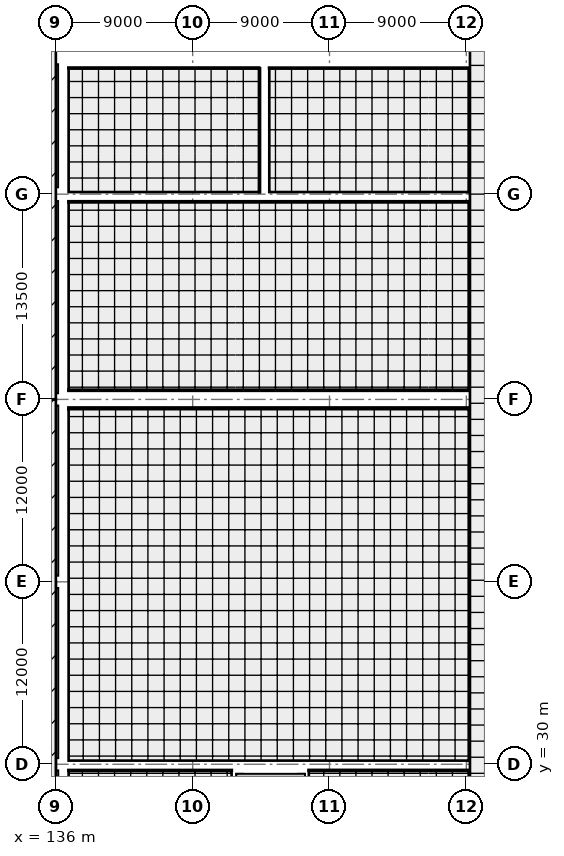
"""IFC4 building model, lengths in metres.
Left out: names, types, materials, properties, quantities, classifications, styles, units other than length and angle.
Written with IfcOpenShell. Run it as: python <this file> out.ifc"""

import sys

from ifc_helpers import new_model, si_unit, direction, frame, frame_2d, origin, origin_2d, place, context, subcontext, project, spatial, rectangle, extrude, element, fill, save


model = new_model("IFC4")
c1 = context("Model", 3, precision=1e-05, world=origin(), true_north=direction((0.0, 1.0)))
c2 = subcontext(c1, "Body", "Model", "MODEL_VIEW")
j1 = project(units=[si_unit("LENGTHUNIT", "METRE"), si_unit("PLANEANGLEUNIT", "RADIAN")], contexts=[c1])
p1 = place(None, origin())
s1 = spatial("IfcSite", under=j1, at=p1, CompositionType="ELEMENT")
p2 = place(p1, origin())
s2 = spatial("IfcBuilding", under=s1, at=p2, CompositionType="ELEMENT")
p3 = place(p2, origin())
s3 = spatial("IfcBuildingStorey", under=s2, at=p3, CompositionType="ELEMENT", Elevation=0.0)
for number, where, z_axis, x_axis in (
    (1, (136.0, 30.0, 0.0), (0.0, 0.0, 1.0), (1.0, 0.0, 0.0)),
    (2, (136.0, 42.0, 0.0), (0.0, 0.0, 1.0), (1.0, 0.0, 0.0)),
    (3, (136.0, 54.0, 0.0), (0.0, 0.0, 1.0), (1.0, 0.0, 0.0)),
):
    element("IfcColumn", number, at=place(p3, frame(where, z_axis=z_axis, x_axis=x_axis)), inside=s3, PredefinedType="COLUMN", context=c2, shape_type="SweptSolid", body=[
        extrude(rectangle(XDim=0.8, YDim=0.8, at=origin_2d()), origin(), (0.0, 0.0, 1.0), 6.6),
    ])
for number, where, z_axis, x_axis in (
    (4, (136.0, 67.5, 0.0), (0.0, 0.0, 1.0), (1.0, 0.0, 0.0)),
    (5, (136.0, 76.5, 0.0), (0.0, 0.0, 1.0), (1.0, 0.0, 0.0)),
):
    element("IfcColumn", number, at=place(p3, frame(where, z_axis=z_axis, x_axis=x_axis)), inside=s3, PredefinedType="COLUMN", context=c2, shape_type="SweptSolid", body=[
        extrude(rectangle(XDim=0.9, YDim=0.9, at=origin_2d()), origin(), (0.0, 0.0, 1.0), 6.6),
    ])
for number, where, z_axis, x_axis in (
    (6, (145.0, 30.0, 0.0), (0.0, 0.0, 1.0), (1.0, 0.0, 0.0)),
    (7, (145.0, 42.0, 0.0), (0.0, 0.0, 1.0), (1.0, 0.0, 0.0)),
    (8, (145.0, 54.0, 0.0), (0.0, 0.0, 1.0), (1.0, 0.0, 0.0)),
):
    element("IfcColumn", number, at=place(p3, frame(where, z_axis=z_axis, x_axis=x_axis)), inside=s3, PredefinedType="COLUMN", context=c2, shape_type="SweptSolid", body=[
        extrude(rectangle(XDim=0.8, YDim=0.8, at=origin_2d()), origin(), (0.0, 0.0, 1.0), 6.6),
    ])
for number, where, z_axis, x_axis in (
    (9, (145.0, 67.5, 0.0), (0.0, 0.0, 1.0), (1.0, 0.0, 0.0)),
    (10, (145.0, 76.5, 0.0), (0.0, 0.0, 1.0), (1.0, 0.0, 0.0)),
):
    element("IfcColumn", number, at=place(p3, frame(where, z_axis=z_axis, x_axis=x_axis)), inside=s3, PredefinedType="COLUMN", context=c2, shape_type="SweptSolid", body=[
        extrude(rectangle(XDim=0.9, YDim=0.9, at=origin_2d()), origin(), (0.0, 0.0, 1.0), 6.6),
    ])
for number, where, z_axis, x_axis in (
    (11, (154.0, 30.0, 0.0), (0.0, 0.0, 1.0), (1.0, 0.0, 0.0)),
    (12, (154.0, 42.0, 0.0), (0.0, 0.0, 1.0), (1.0, 0.0, 0.0)),
    (13, (154.0, 54.0, 0.0), (0.0, 0.0, 1.0), (1.0, 0.0, 0.0)),
):
    element("IfcColumn", number, at=place(p3, frame(where, z_axis=z_axis, x_axis=x_axis)), inside=s3, PredefinedType="COLUMN", context=c2, shape_type="SweptSolid", body=[
        extrude(rectangle(XDim=0.8, YDim=0.8, at=origin_2d()), origin(), (0.0, 0.0, 1.0), 6.6),
    ])
for number, where, z_axis, x_axis in (
    (14, (154.0, 67.5, 0.0), (0.0, 0.0, 1.0), (1.0, 0.0, 0.0)),
    (15, (154.0, 76.5, 0.0), (0.0, 0.0, 1.0), (1.0, 0.0, 0.0)),
):
    element("IfcColumn", number, at=place(p3, frame(where, z_axis=z_axis, x_axis=x_axis)), inside=s3, PredefinedType="COLUMN", context=c2, shape_type="SweptSolid", body=[
        extrude(rectangle(XDim=0.9, YDim=0.9, at=origin_2d()), origin(), (0.0, 0.0, 1.0), 6.6),
    ])
for number, where, z_axis, x_axis in (
    (16, (163.0, 30.0, 0.0), (0.0, 0.0, 1.0), (1.0, 0.0, 0.0)),
    (17, (163.0, 42.0, 0.0), (0.0, 0.0, 1.0), (1.0, 0.0, 0.0)),
    (18, (163.0, 54.0, 0.0), (0.0, 0.0, 1.0), (1.0, 0.0, 0.0)),
):
    element("IfcColumn", number, at=place(p3, frame(where, z_axis=z_axis, x_axis=x_axis)), inside=s3, PredefinedType="COLUMN", context=c2, shape_type="SweptSolid", body=[
        extrude(rectangle(XDim=0.8, YDim=0.8, at=origin_2d()), origin(), (0.0, 0.0, 1.0), 6.6),
    ])
for number, where, z_axis, x_axis in (
    (19, (163.0, 67.5, 0.0), (0.0, 0.0, 1.0), (1.0, 0.0, 0.0)),
    (20, (163.0, 76.5, 0.0), (0.0, 0.0, 1.0), (1.0, 0.0, 0.0)),
):
    element("IfcColumn", number, at=place(p3, frame(where, z_axis=z_axis, x_axis=x_axis)), inside=s3, PredefinedType="COLUMN", context=c2, shape_type="SweptSolid", body=[
        extrude(rectangle(XDim=0.9, YDim=0.9, at=origin_2d()), origin(), (0.0, 0.0, 1.0), 6.6),
    ])
p4 = place(p3, frame((136.0, 18.4, 0.0), z_axis=(0.0, 0.0, 1.0), x_axis=(0.0, 1.0, 0.0)))
e21 = element("IfcWall", 21, at=p4, inside=s3, PredefinedType="SOLIDWALL", context=c2, shape_type="SweptSolid", body=[
    extrude(rectangle(XDim=11.2, YDim=0.32, at=frame_2d((5.6, 0.0))), origin(), (0.0, 0.0, 1.0), 5.785),
])
p5 = place(p3, frame((136.0, 30.4, 0.0), z_axis=(0.0, 0.0, 1.0), x_axis=(0.0, 1.0, 0.0)))
e22 = element("IfcWall", 22, at=p5, inside=s3, PredefinedType="SOLIDWALL", context=c2, shape_type="SweptSolid", body=[
    extrude(rectangle(XDim=11.2, YDim=0.32, at=frame_2d((5.6, 0.0))), origin(), (0.0, 0.0, 1.0), 5.785),
])
p6 = place(p5, frame((2.767, 0.0, 0.0)))
e23 = element("IfcOpeningElement", 23, at=p6, cuts=e22, PredefinedType="OPENING", context=c2, shape_type="SweptSolid", body=[
    extrude(rectangle(XDim=2.2, YDim=2.45, at=frame_2d((1.1, 1.225))), frame((0.0, 0.17, 0.0), z_axis=(0.0, -1.0, 0.0), x_axis=(1.0, 0.0, 0.0)), (0.0, 0.0, 1.0), 0.34),
])
p7 = place(p5, frame((6.283, 0.0, 0.95)))
e24 = element("IfcOpeningElement", 24, at=p7, cuts=e22, PredefinedType="OPENING", context=c2, shape_type="SweptSolid", body=[
    extrude(rectangle(XDim=2.1, YDim=2.0, at=frame_2d((1.05, 1.0))), frame((0.0, 0.17, 0.0), z_axis=(0.0, -1.0, 0.0), x_axis=(1.0, 0.0, 0.0)), (0.0, 0.0, 1.0), 0.34),
])
p8 = place(p3, frame((136.0, 42.4, 0.0), z_axis=(0.0, 0.0, 1.0), x_axis=(0.0, 1.0, 0.0)))
e25 = element("IfcWall", 25, at=p8, inside=s3, PredefinedType="SOLIDWALL", context=c2, shape_type="SweptSolid", body=[
    extrude(rectangle(XDim=11.2, YDim=0.32, at=frame_2d((5.6, 0.0))), origin(), (0.0, 0.0, 1.0), 5.77),
])
p9 = place(p8, frame((2.867, 0.0, 0.0)))
e26 = element("IfcOpeningElement", 26, at=p9, cuts=e25, PredefinedType="OPENING", context=c2, shape_type="SweptSolid", body=[
    extrude(rectangle(XDim=2.0, YDim=2.4, at=frame_2d((1.0, 1.2))), frame((0.0, 0.17, 0.0), z_axis=(0.0, -1.0, 0.0), x_axis=(1.0, 0.0, 0.0)), (0.0, 0.0, 1.0), 0.34),
])
p10 = place(p8, frame((6.433, 0.0, 0.95)))
e27 = element("IfcOpeningElement", 27, at=p10, cuts=e25, PredefinedType="OPENING", context=c2, shape_type="SweptSolid", body=[
    extrude(rectangle(XDim=1.8, YDim=2.0, at=frame_2d((0.9, 1.0))), frame((0.0, 0.17, 0.0), z_axis=(0.0, -1.0, 0.0), x_axis=(1.0, 0.0, 0.0)), (0.0, 0.0, 1.0), 0.34),
])
p11 = place(p3, frame((136.0, 54.4, 0.0), z_axis=(0.0, 0.0, 1.0), x_axis=(0.0, 1.0, 0.0)))
e28 = element("IfcWall", 28, at=p11, inside=s3, PredefinedType="SOLIDWALL", context=c2, shape_type="SweptSolid", body=[
    extrude(rectangle(XDim=12.65, YDim=0.3, at=frame_2d((6.325, 0.0))), origin(), (0.0, 0.0, 1.0), 5.77),
])
p12 = place(p11, frame((3.567, 0.0, 0.95)))
e29 = element("IfcOpeningElement", 29, at=p12, cuts=e28, PredefinedType="OPENING", context=c2, shape_type="SweptSolid", body=[
    extrude(rectangle(XDim=1.6, YDim=1.9, at=frame_2d((0.8, 0.95))), frame((0.0, 0.16, 0.0), z_axis=(0.0, -1.0, 0.0), x_axis=(1.0, 0.0, 0.0)), (0.0, 0.0, 1.0), 0.32),
])
p13 = place(p11, frame((6.833, 0.0, 0.95)))
e30 = element("IfcOpeningElement", 30, at=p13, cuts=e28, PredefinedType="OPENING", context=c2, shape_type="SweptSolid", body=[
    extrude(rectangle(XDim=3.0, YDim=2.1, at=frame_2d((1.5, 1.05))), frame((0.0, 0.16, 0.0), z_axis=(0.0, -1.0, 0.0), x_axis=(1.0, 0.0, 0.0)), (0.0, 0.0, 1.0), 0.32),
])
p14 = place(p3, frame((136.0, 67.95, 0.0), z_axis=(0.0, 0.0, 1.0), x_axis=(0.0, 1.0, 0.0)))
e31 = element("IfcWall", 31, at=p14, inside=s3, PredefinedType="SOLIDWALL", context=c2, shape_type="SweptSolid", body=[
    extrude(rectangle(XDim=8.1, YDim=0.3, at=frame_2d((4.05, 0.0))), origin(), (0.0, 0.0, 1.0), 5.77),
])
p15 = place(p14, frame((2.7, 0.0, 0.95)))
e32 = element("IfcOpeningElement", 32, at=p15, cuts=e31, PredefinedType="OPENING", context=c2, shape_type="SweptSolid", body=[
    extrude(rectangle(XDim=2.7, YDim=2.1, at=frame_2d((1.35, 1.05))), frame((0.0, 0.16, 0.0), z_axis=(0.0, -1.0, 0.0), x_axis=(1.0, 0.0, 0.0)), (0.0, 0.0, 1.0), 0.32),
])
for number, where, z_axis, x_axis in (
    (33, (152.163, 18.675, 0.0), (0.0, 0.0, 1.0), (0.0, 1.0, 0.0)),
    (34, (148.093, 29.373, 0.0), (0.0, 0.0, 1.0), (0.0, -1.0, 0.0)),
):
    element("IfcWall", number, at=place(p3, frame(where, z_axis=z_axis, x_axis=x_axis)), inside=s3, PredefinedType="SHEAR", context=c2, shape_type="SweptSolid", body=[
        extrude(rectangle(XDim=10.698, YDim=0.45, at=frame_2d((5.349, 0.0))), origin(), (0.0, 0.0, 1.0), 6.36),
    ])
p16 = place(p3, frame((152.387, 29.147, 0.0), z_axis=(0.0, 0.0, 1.0), x_axis=(-1.0, 0.0, 0.0)))
e35 = element("IfcWall", 35, at=p16, inside=s3, PredefinedType="SHEAR", context=c2, shape_type="SweptSolid", body=[
    extrude(rectangle(XDim=4.52, YDim=0.45, at=frame_2d((2.26, 0.0))), origin(), (0.0, 0.0, 1.0), 6.36),
])
p17 = place(p3, frame((152.6, 29.6, 0.0), z_axis=(0.0, 0.0, 1.0), x_axis=(1.0, 0.0, 0.0)))
e36 = element("IfcWall", 36, at=p17, inside=s3, PredefinedType="PARTITIONING", context=c2, shape_type="SweptSolid", body=[
    extrude(rectangle(XDim=10.6, YDim=0.11, at=frame_2d((5.3, 0.0))), origin(), (0.0, 0.0, 1.0), 4.4),
])
p18 = place(p3, frame((163.2, 29.6, 0.0), z_axis=(0.0, 0.0, 1.0), x_axis=(0.0, -1.0, 0.0)))
e37 = element("IfcWall", 37, at=p18, inside=s3, PredefinedType="PARTITIONING", context=c2, shape_type="SweptSolid", body=[
    extrude(rectangle(XDim=12.8, YDim=0.11, at=frame_2d((6.4, 0.0))), origin(), (0.0, 0.0, 1.0), 4.4),
])
p19 = place(p18, frame((5.625, 0.0, 0.0)))
e38 = element("IfcOpeningElement", 38, at=p19, cuts=e37, PredefinedType="OPENING", context=c2, shape_type="SweptSolid", body=[
    extrude(rectangle(XDim=1.55, YDim=2.1, at=frame_2d((0.775, 1.05))), frame((0.0, 0.065, 0.0), z_axis=(0.0, -1.0, 0.0), x_axis=(1.0, 0.0, 0.0)), (0.0, 0.0, 1.0), 0.13),
])
p20 = place(p3, frame((136.8, 29.6, 0.0), z_axis=(0.0, 0.0, 1.0), x_axis=(1.0, 0.0, 0.0)))
e39 = element("IfcWall", 39, at=p20, inside=s3, PredefinedType="PARTITIONING", context=c2, shape_type="SweptSolid", body=[
    extrude(rectangle(XDim=10.8, YDim=0.1, at=frame_2d((5.4, 0.0))), origin(), (0.0, 0.0, 1.0), 4.4),
])
p21 = place(p3, frame((136.8, 53.4, 0.0), z_axis=(0.0, 0.0, 1.0), x_axis=(1.0, 0.0, 0.0)))
e40 = element("IfcWall", 40, at=p21, inside=s3, PredefinedType="PARTITIONING", context=c2, shape_type="SweptSolid", body=[
    extrude(rectangle(XDim=26.4, YDim=0.19, at=frame_2d((13.2, 0.0))), origin(), (0.0, 0.0, 1.0), 4.4),
])
p22 = place(p3, frame((163.2, 53.4, 0.0), z_axis=(0.0, 0.0, 1.0), x_axis=(0.0, -1.0, 0.0)))
e41 = element("IfcWall", 41, at=p22, inside=s3, PredefinedType="PARTITIONING", context=c2, shape_type="SweptSolid", body=[
    extrude(rectangle(XDim=23.2, YDim=0.19, at=frame_2d((11.6, 0.0))), origin(), (0.0, 0.0, 1.0), 4.4),
])
p23 = place(p22, frame((12.425, 0.0, 0.0)))
e42 = element("IfcOpeningElement", 42, at=p23, cuts=e41, PredefinedType="OPENING", context=c2, shape_type="SweptSolid", body=[
    extrude(rectangle(XDim=1.55, YDim=2.1, at=frame_2d((0.775, 1.05))), frame((0.0, 0.105, 0.0), z_axis=(0.0, -1.0, 0.0), x_axis=(1.0, 0.0, 0.0)), (0.0, 0.0, 1.0), 0.21),
])
for number, where, z_axis, x_axis in (
    (43, (163.2, 54.6, 0.0), (0.0, 0.0, 1.0), (-1.0, 0.0, 0.0)),
    (44, (136.8, 67.0, 0.0), (0.0, 0.0, 1.0), (1.0, 0.0, 0.0)),
):
    element("IfcWall", number, at=place(p3, frame(where, z_axis=z_axis, x_axis=x_axis)), inside=s3, PredefinedType="PARTITIONING", context=c2, shape_type="SweptSolid", body=[
        extrude(rectangle(XDim=26.4, YDim=0.12, at=frame_2d((13.2, 0.0))), origin(), (0.0, 0.0, 1.0), 4.4),
    ])
p24 = place(p3, frame((163.2, 67.0, 0.0), z_axis=(0.0, 0.0, 1.0), x_axis=(0.0, -1.0, 0.0)))
e45 = element("IfcWall", 45, at=p24, inside=s3, PredefinedType="PARTITIONING", context=c2, shape_type="SweptSolid", body=[
    extrude(rectangle(XDim=12.4, YDim=0.12, at=frame_2d((6.2, 0.0))), origin(), (0.0, 0.0, 1.0), 4.4),
])
p25 = place(p24, frame((5.525, 0.0, 0.0)))
e46 = element("IfcOpeningElement", 46, at=p25, cuts=e45, PredefinedType="OPENING", context=c2, shape_type="SweptSolid", body=[
    extrude(rectangle(XDim=1.35, YDim=2.1, at=frame_2d((0.675, 1.05))), frame((0.0, 0.07, 0.0), z_axis=(0.0, -1.0, 0.0), x_axis=(1.0, 0.0, 0.0)), (0.0, 0.0, 1.0), 0.14),
])
p26 = place(p3, frame((136.8, 75.8, 0.0), z_axis=(0.0, 0.0, 1.0), x_axis=(1.0, 0.0, 0.0)))
e47 = element("IfcWall", 47, at=p26, inside=s3, PredefinedType="PARTITIONING", context=c2, shape_type="SweptSolid", body=[
    extrude(rectangle(XDim=12.6, YDim=0.11, at=frame_2d((6.3, 0.0))), origin(), (0.0, 0.0, 1.0), 4.4),
])
p27 = place(p26, frame((5.85, 0.0, 0.0)))
e48 = element("IfcOpeningElement", 48, at=p27, cuts=e47, PredefinedType="OPENING", context=c2, shape_type="SweptSolid", body=[
    extrude(rectangle(XDim=0.9, YDim=2.1, at=frame_2d((0.45, 1.05))), frame((0.0, 0.065, 0.0), z_axis=(0.0, -1.0, 0.0), x_axis=(1.0, 0.0, 0.0)), (0.0, 0.0, 1.0), 0.13),
])
p28 = place(p3, frame((149.4, 75.8, 0.0), z_axis=(0.0, 0.0, 1.0), x_axis=(0.0, -1.0, 0.0)))
e49 = element("IfcWall", 49, at=p28, inside=s3, PredefinedType="PARTITIONING", context=c2, shape_type="SweptSolid", body=[
    extrude(rectangle(XDim=8.2, YDim=0.11, at=frame_2d((4.1, 0.0))), origin(), (0.0, 0.0, 1.0), 4.4),
])
p29 = place(p3, frame((150.0, 75.8, 0.0), z_axis=(0.0, 0.0, 1.0), x_axis=(1.0, 0.0, 0.0)))
e50 = element("IfcWall", 50, at=p29, inside=s3, PredefinedType="PARTITIONING", context=c2, shape_type="SweptSolid", body=[
    extrude(rectangle(XDim=13.2, YDim=0.1, at=frame_2d((6.6, 0.0))), origin(), (0.0, 0.0, 1.0), 4.4),
])
p30 = place(p29, frame((6.15, 0.0, 0.0)))
e51 = element("IfcOpeningElement", 51, at=p30, cuts=e50, PredefinedType="OPENING", context=c2, shape_type="SweptSolid", body=[
    extrude(rectangle(XDim=0.9, YDim=2.1, at=frame_2d((0.45, 1.05))), frame((0.0, 0.06, 0.0), z_axis=(0.0, -1.0, 0.0), x_axis=(1.0, 0.0, 0.0)), (0.0, 0.0, 1.0), 0.12),
])
p31 = place(p3, frame((163.2, 75.8, 0.0), z_axis=(0.0, 0.0, 1.0), x_axis=(0.0, -1.0, 0.0)))
e52 = element("IfcWall", 52, at=p31, inside=s3, PredefinedType="PARTITIONING", context=c2, shape_type="SweptSolid", body=[
    extrude(rectangle(XDim=8.2, YDim=0.1, at=frame_2d((4.1, 0.0))), origin(), (0.0, 0.0, 1.0), 4.4),
])
p32 = place(p6, origin())
e53 = element("IfcDoor", 53, at=p32, inside=s3, OperationType="SINGLE_SWING_LEFT", PredefinedType="DOOR", context=c2, shape_type="SweptSolid", body=[
    extrude(rectangle(XDim=2.2, YDim=2.45, at=frame_2d((1.1, 1.225))), frame((0.0, 0.025, 0.0), z_axis=(0.0, -1.0, 0.0), x_axis=(1.0, 0.0, 0.0)), (0.0, 0.0, 1.0), 0.05),
])
fill(e23, e53)
p33 = place(p7, origin())
e54 = element("IfcWindow", 54, at=p33, inside=s3, PartitioningType="SINGLE_PANEL", PredefinedType="WINDOW", context=c2, shape_type="SweptSolid", body=[
    extrude(rectangle(XDim=2.1, YDim=2.0, at=frame_2d((1.05, 1.0))), frame((0.0, 0.03, 0.0), z_axis=(0.0, -1.0, 0.0), x_axis=(1.0, 0.0, 0.0)), (0.0, 0.0, 1.0), 0.06),
])
fill(e24, e54)
p34 = place(p9, origin())
e55 = element("IfcDoor", 55, at=p34, inside=s3, OperationType="SINGLE_SWING_RIGHT", PredefinedType="DOOR", context=c2, shape_type="SweptSolid", body=[
    extrude(rectangle(XDim=2.0, YDim=2.4, at=frame_2d((1.0, 1.2))), frame((0.0, 0.025, 0.0), z_axis=(0.0, -1.0, 0.0), x_axis=(1.0, 0.0, 0.0)), (0.0, 0.0, 1.0), 0.05),
])
fill(e26, e55)
p35 = place(p10, origin())
e56 = element("IfcWindow", 56, at=p35, inside=s3, PartitioningType="SINGLE_PANEL", PredefinedType="WINDOW", context=c2, shape_type="SweptSolid", body=[
    extrude(rectangle(XDim=1.8, YDim=2.0, at=frame_2d((0.9, 1.0))), frame((0.0, 0.03, 0.0), z_axis=(0.0, -1.0, 0.0), x_axis=(1.0, 0.0, 0.0)), (0.0, 0.0, 1.0), 0.06),
])
fill(e27, e56)
p36 = place(p12, origin())
e57 = element("IfcWindow", 57, at=p36, inside=s3, PartitioningType="SINGLE_PANEL", PredefinedType="WINDOW", context=c2, shape_type="SweptSolid", body=[
    extrude(rectangle(XDim=1.6, YDim=1.9, at=frame_2d((0.8, 0.95))), frame((0.0, 0.03, 0.0), z_axis=(0.0, -1.0, 0.0), x_axis=(1.0, 0.0, 0.0)), (0.0, 0.0, 1.0), 0.06),
])
fill(e29, e57)
p37 = place(p13, origin())
e58 = element("IfcWindow", 58, at=p37, inside=s3, PartitioningType="SINGLE_PANEL", PredefinedType="WINDOW", context=c2, shape_type="SweptSolid", body=[
    extrude(rectangle(XDim=3.0, YDim=2.1, at=frame_2d((1.5, 1.05))), frame((0.0, 0.03, 0.0), z_axis=(0.0, -1.0, 0.0), x_axis=(1.0, 0.0, 0.0)), (0.0, 0.0, 1.0), 0.06),
])
fill(e30, e58)
p38 = place(p15, origin())
e59 = element("IfcWindow", 59, at=p38, inside=s3, PartitioningType="SINGLE_PANEL", PredefinedType="WINDOW", context=c2, shape_type="SweptSolid", body=[
    extrude(rectangle(XDim=2.7, YDim=2.1, at=frame_2d((1.35, 1.05))), frame((0.0, 0.03, 0.0), z_axis=(0.0, -1.0, 0.0), x_axis=(1.0, 0.0, 0.0)), (0.0, 0.0, 1.0), 0.06),
])
fill(e32, e59)
p39 = place(p23, origin())
e60 = element("IfcDoor", 60, at=p39, inside=s3, OperationType="SINGLE_SWING_RIGHT", PredefinedType="DOOR", context=c2, shape_type="SweptSolid", body=[
    extrude(rectangle(XDim=1.55, YDim=2.1, at=frame_2d((0.775, 1.05))), frame((0.0, 0.025, 0.0), z_axis=(0.0, -1.0, 0.0), x_axis=(1.0, 0.0, 0.0)), (0.0, 0.0, 1.0), 0.05),
])
fill(e42, e60)
p40 = place(p25, origin())
e61 = element("IfcDoor", 61, at=p40, inside=s3, OperationType="SINGLE_SWING_RIGHT", PredefinedType="DOOR", context=c2, shape_type="SweptSolid", body=[
    extrude(rectangle(XDim=1.35, YDim=2.1, at=frame_2d((0.675, 1.05))), frame((0.0, 0.025, 0.0), z_axis=(0.0, -1.0, 0.0), x_axis=(1.0, 0.0, 0.0)), (0.0, 0.0, 1.0), 0.05),
])
fill(e46, e61)
p41 = place(p27, origin())
e62 = element("IfcDoor", 62, at=p41, inside=s3, OperationType="SINGLE_SWING_LEFT", PredefinedType="DOOR", context=c2, shape_type="SweptSolid", body=[
    extrude(rectangle(XDim=0.9, YDim=2.1, at=frame_2d((0.45, 1.05))), frame((0.0, 0.025, 0.0), z_axis=(0.0, -1.0, 0.0), x_axis=(1.0, 0.0, 0.0)), (0.0, 0.0, 1.0), 0.05),
])
fill(e48, e62)
p42 = place(p30, origin())
e63 = element("IfcDoor", 63, at=p42, inside=s3, OperationType="SINGLE_SWING_RIGHT", PredefinedType="DOOR", context=c2, shape_type="SweptSolid", body=[
    extrude(rectangle(XDim=0.9, YDim=2.1, at=frame_2d((0.45, 1.05))), frame((0.0, 0.025, 0.0), z_axis=(0.0, -1.0, 0.0), x_axis=(1.0, 0.0, 0.0)), (0.0, 0.0, 1.0), 0.05),
])
fill(e51, e63)
save(model, sys.argv[1])
